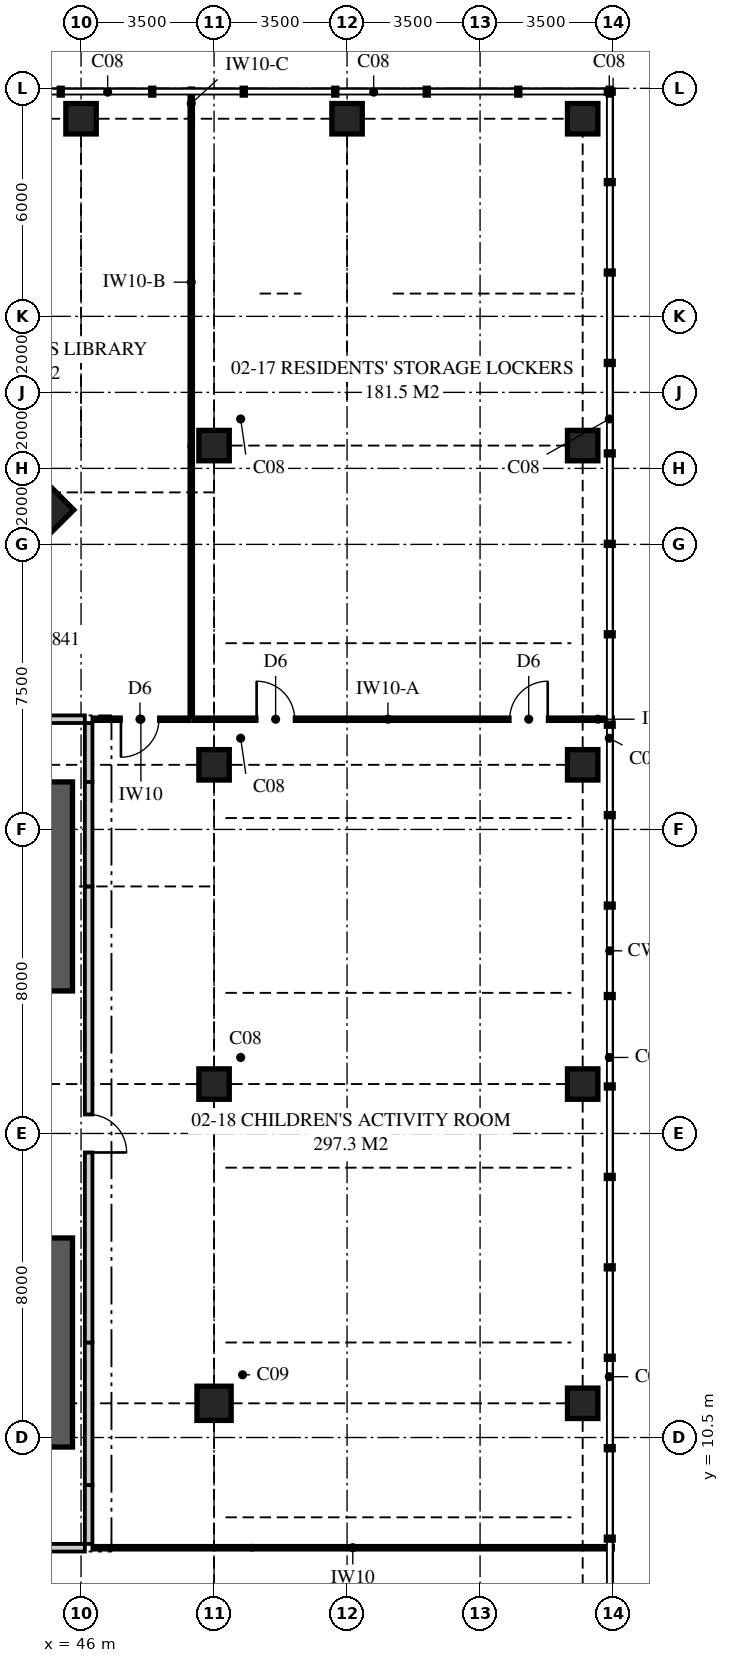
"""IFC4 building model, lengths in metres.
Left out: names, types, materials, properties, quantities, classifications, styles, units other than length and angle.
Written with IfcOpenShell. Run it as: python <this file> out.ifc"""

import sys

from ifc_helpers import new_model, si_unit, direction, frame, frame_2d, origin, origin_2d, place, context, subcontext, project, spatial, polyline, rectangle, outline, extrude, element, fill, save


model = new_model("IFC4")
c1 = context("Model", 3, precision=1e-05, world=origin(), true_north=direction((0.0, 1.0)))
c2 = subcontext(c1, "Body", "Model", "MODEL_VIEW")
j1 = project(units=[si_unit("LENGTHUNIT", "METRE"), si_unit("PLANEANGLEUNIT", "RADIAN")], contexts=[c1])
p1 = place(None, origin())
s1 = spatial("IfcSite", under=j1, at=p1, CompositionType="ELEMENT")
p2 = place(p1, origin())
s2 = spatial("IfcBuilding", under=s1, at=p2, CompositionType="ELEMENT")
p3 = place(p2, frame((0.0, 0.0, 11.0)))
s3 = spatial("IfcBuildingStorey", under=s2, at=p3, CompositionType="ELEMENT", Elevation=11.0)
p4 = place(p3, frame((43.369, 35.369, 0.0), z_axis=(0.0, 0.0, 1.0), x_axis=(-0.707106781187, -0.707106781187, 0.0)))
e1 = element("IfcColumn", 1, at=p4, inside=s3, PredefinedType="COLUMN", context=c2, shape_type="SweptSolid", body=[
    extrude(rectangle(XDim=2.8, YDim=4.1, at=origin_2d()), origin(), (0.0, 0.0, 1.0), 5.0),
])
p5 = place(p3, frame((49.5, 11.4, 0.0), z_axis=(0.0, 0.0, 1.0), x_axis=(1.0, 0.0, 0.0)))
e2 = element("IfcColumn", 2, at=p5, inside=s3, PredefinedType="COLUMN", context=c2, shape_type="SweptSolid", body=[
    extrude(rectangle(XDim=0.9, YDim=0.9, at=origin_2d()), origin(), (0.0, 0.0, 1.0), 5.0),
])
for number, where, z_axis, x_axis in (
    (3, (59.2, 11.4, 0.0), (0.0, 0.0, 1.0), (1.0, 0.0, 0.0)),
    (4, (49.5, 19.8, 0.0), (0.0, 0.0, 1.0), (1.0, 0.0, 0.0)),
    (5, (59.2, 19.8, 0.0), (0.0, 0.0, 1.0), (1.0, 0.0, 0.0)),
    (6, (49.5, 28.2, 0.0), (0.0, 0.0, 1.0), (1.0, 0.0, 0.0)),
    (7, (59.2, 28.2, 0.0), (0.0, 0.0, 1.0), (1.0, 0.0, 0.0)),
    (8, (49.5, 36.6, 0.0), (0.0, 0.0, 1.0), (1.0, 0.0, 0.0)),
    (9, (59.2, 36.6, 0.0), (0.0, 0.0, 1.0), (1.0, 0.0, 0.0)),
    (10, (46.0, 45.2, 0.0), (0.0, 0.0, 1.0), (1.0, 0.0, 0.0)),
    (11, (53.0, 45.2, 0.0), (0.0, 0.0, 1.0), (1.0, 0.0, 0.0)),
    (12, (59.2, 45.2, 0.0), (0.0, 0.0, 1.0), (1.0, 0.0, 0.0)),
):
    element("IfcColumn", number, at=place(p3, frame(where, z_axis=z_axis, x_axis=x_axis)), inside=s3, PredefinedType="COLUMN", context=c2, shape_type="SweptSolid", body=[
        extrude(rectangle(XDim=0.8, YDim=0.8, at=origin_2d()), origin(), (0.0, 0.0, 1.0), 5.0),
    ])
p6 = place(p3, frame((30.05, 7.6, 0.0), z_axis=(0.0, 0.0, 1.0), x_axis=(1.0, 0.0, 0.0)))
e13 = element("IfcWall", 13, at=p6, inside=s3, PredefinedType="PARTITIONING", context=c2, shape_type="SweptSolid", body=[
    extrude(outline(polyline([(0.0, 0.0), (16.05, 0.0), (16.05, 4.72), (14.629, 4.72), (14.629, 3.82), (12.009, 3.82), (12.009, 4.72), (6.26, 4.72), (6.26, 4.02), (3.64, 4.02), (3.64, 4.72), (0.26, 4.72), (0.26, 4.02), (0.0, 4.02), (0.0, 4.72), (0.0, 0.0)])), frame((0.0, 0.1, 0.0), z_axis=(0.0, -1.0, 0.0), x_axis=(1.0, 0.0, 0.0)), (0.0, 0.0, 1.0), 0.2),
])
p7 = place(p6, frame((7.55, 0.0, 0.0)))
e14 = element("IfcOpeningElement", 14, at=p7, cuts=e13, PredefinedType="OPENING", context=c2, shape_type="SweptSolid", body=[
    extrude(rectangle(XDim=1.0, YDim=2.1, at=frame_2d((0.5, 1.05))), frame((0.0, 0.11, 0.0), z_axis=(0.0, -1.0, 0.0), x_axis=(1.0, 0.0, 0.0)), (0.0, 0.0, 1.0), 0.22),
])
p8 = place(p3, frame((46.3, 7.6, 0.0), z_axis=(0.0, 0.0, 1.0), x_axis=(1.0, 0.0, 0.0)))
e15 = element("IfcWall", 15, at=p8, inside=s3, PredefinedType="PARTITIONING", context=c2, shape_type="SweptSolid", body=[
    extrude(outline(polyline([(0.0, 0.0), (4.2, 0.0), (4.2, 4.72), (3.56, 4.72), (3.56, 3.52), (2.84, 3.52), (2.84, 4.72), (0.0, 4.72), (0.0, 0.0)])), frame((0.0, 0.05, 0.0), z_axis=(0.0, -1.0, 0.0), x_axis=(1.0, 0.0, 0.0)), (0.0, 0.0, 1.0), 0.1),
])
p9 = place(p3, frame((50.5, 7.6, 0.0), z_axis=(0.0, 0.0, 1.0), x_axis=(1.0, 0.0, 0.0)))
e16 = element("IfcWall", 16, at=p9, inside=s3, PredefinedType="PARTITIONING", context=c2, shape_type="SweptSolid", body=[
    extrude(outline(polyline([(0.0, 0.0), (9.5, 0.0), (9.5, 4.72), (9.06, 4.72), (9.06, 3.52), (8.34, 3.52), (8.34, 4.72), (0.0, 4.72), (0.0, 0.0)])), frame((0.0, 0.05, 0.0), z_axis=(0.0, -1.0, 0.0), x_axis=(1.0, 0.0, 0.0)), (0.0, 0.0, 1.0), 0.1),
])
p10 = place(p3, frame((46.2, 7.7, 0.0), z_axis=(0.0, 0.0, 1.0), x_axis=(0.0, 1.0, 0.0)))
e17 = element("IfcWall", 17, at=p10, inside=s3, PredefinedType="PARTITIONING", context=c2, shape_type="SweptSolid", body=[
    extrude(rectangle(XDim=1.55, YDim=0.2, at=frame_2d((0.775, 0.0))), origin(), (0.0, 0.0, 1.0), 4.72),
])
p11 = place(p3, frame((46.2, 27.75, 0.0), z_axis=(0.0, 0.0, 1.0), x_axis=(0.0, 1.0, 0.0)))
e18 = element("IfcWall", 18, at=p11, inside=s3, PredefinedType="PARTITIONING", context=c2, shape_type="SweptSolid", body=[
    extrude(outline(polyline([(0.0, 0.0), (1.55, 0.0), (1.55, 4.72), (1.55, 4.02), (0.0, 4.02), (0.0, 4.72), (0.0, 0.0)])), frame((0.0, 0.1, 0.0), z_axis=(0.0, -1.0, 0.0), x_axis=(1.0, 0.0, 0.0)), (0.0, 0.0, 1.0), 0.2),
])
p12 = place(p3, frame((42.6, 29.4, 0.0), z_axis=(0.0, 0.0, 1.0), x_axis=(1.0, 0.0, 0.0)))
e19 = element("IfcWall", 19, at=p12, inside=s3, PredefinedType="PARTITIONING", context=c2, shape_type="SweptSolid", body=[
    extrude(rectangle(XDim=3.5, YDim=0.2, at=frame_2d((1.75, 0.0))), origin(), (0.0, 0.0, 1.0), 4.02),
])
p13 = place(p12, origin())
e20 = element("IfcOpeningElement", 20, at=p13, cuts=e19, PredefinedType="OPENING", context=c2, shape_type="SweptSolid", body=[
    extrude(rectangle(XDim=1.0, YDim=2.1, at=frame_2d((0.5, 1.05))), frame((0.0, 0.11, 0.0), z_axis=(0.0, -1.0, 0.0), x_axis=(1.0, 0.0, 0.0)), (0.0, 0.0, 1.0), 0.22),
])
p14 = place(p3, frame((46.2, 9.25, 0.0), z_axis=(0.0, 0.0, 1.0), x_axis=(0.0, 1.0, 0.0)))
e21 = element("IfcWall", 21, at=p14, inside=s3, PredefinedType="PARTITIONING", context=c2, shape_type="SweptSolid", body=[
    extrude(outline(polyline([(0.0, 0.0), (3.75, 0.0), (3.75, 4.02), (3.64, 4.02), (3.64, 4.72), (3.46, 4.72), (3.46, 4.02), (0.84, 4.02), (0.84, 4.72), (0.0, 4.72), (0.0, 0.0)])), frame((0.0, 0.1, 0.0), z_axis=(0.0, -1.0, 0.0), x_axis=(1.0, 0.0, 0.0)), (0.0, 0.0, 1.0), 0.2),
])
p15 = place(p3, frame((46.2, 13.0, 0.0), z_axis=(0.0, 0.0, 1.0), x_axis=(0.0, 1.0, 0.0)))
e22 = element("IfcWall", 22, at=p15, inside=s3, PredefinedType="PARTITIONING", context=c2, shape_type="SweptSolid", body=[
    extrude(rectangle(XDim=12.0, YDim=0.2, at=frame_2d((6.0, 0.0))), origin(), (0.0, 0.0, 1.0), 4.02),
])
p16 = place(p15, frame((5.0, 0.0, 0.0)))
e23 = element("IfcOpeningElement", 23, at=p16, cuts=e22, PredefinedType="OPENING", context=c2, shape_type="SweptSolid", body=[
    extrude(rectangle(XDim=1.0, YDim=2.1, at=frame_2d((0.5, 1.05))), frame((0.0, 0.11, 0.0), z_axis=(0.0, -1.0, 0.0), x_axis=(1.0, 0.0, 0.0)), (0.0, 0.0, 1.0), 0.22),
])
p17 = place(p3, frame((46.2, 25.0, 0.0), z_axis=(0.0, 0.0, 1.0), x_axis=(0.0, 1.0, 0.0)))
e24 = element("IfcWall", 24, at=p17, inside=s3, PredefinedType="PARTITIONING", context=c2, shape_type="SweptSolid", body=[
    extrude(outline(polyline([(0.0, 0.0), (2.75, 0.0), (2.75, 4.02), (1.89, 4.02), (1.89, 4.72), (1.31, 4.72), (1.31, 4.02), (0.0, 4.02), (0.0, 0.0)])), frame((0.0, 0.1, 0.0), z_axis=(0.0, -1.0, 0.0), x_axis=(1.0, 0.0, 0.0)), (0.0, 0.0, 1.0), 0.2),
])
p18 = place(p3, frame((48.95, 29.4, 0.0), z_axis=(0.0, 0.0, 1.0), x_axis=(1.0, 0.0, 0.0)))
e25 = element("IfcWall", 25, at=p18, inside=s3, PredefinedType="PARTITIONING", context=c2, shape_type="SweptSolid", body=[
    extrude(outline(polyline([(0.0, 0.0), (10.25, 0.0), (10.25, 3.52), (9.95, 3.52), (9.95, 4.02), (0.91, 4.02), (0.91, 3.52), (0.25, 3.52), (0.25, 4.02), (0.0, 4.02), (0.0, 0.0)])), frame((0.0, 0.05, 0.0), z_axis=(0.0, -1.0, 0.0), x_axis=(1.0, 0.0, 0.0)), (0.0, 0.0, 1.0), 0.1),
])
p19 = place(p18, frame((1.67, 0.0, 0.0)))
e26 = element("IfcOpeningElement", 26, at=p19, cuts=e25, PredefinedType="OPENING", context=c2, shape_type="SweptSolid", body=[
    extrude(rectangle(XDim=1.0, YDim=2.1, at=frame_2d((0.5, 1.05))), frame((0.0, 0.06, 0.0), z_axis=(0.0, -1.0, 0.0), x_axis=(1.0, 0.0, 0.0)), (0.0, 0.0, 1.0), 0.12),
])
p20 = place(p18, frame((8.33, 0.0, 0.0)))
e27 = element("IfcOpeningElement", 27, at=p20, cuts=e25, PredefinedType="OPENING", context=c2, shape_type="SweptSolid", body=[
    extrude(rectangle(XDim=1.0, YDim=2.1, at=frame_2d((0.5, 1.05))), frame((0.0, 0.06, 0.0), z_axis=(0.0, -1.0, 0.0), x_axis=(1.0, 0.0, 0.0)), (0.0, 0.0, 1.0), 0.12),
])
p21 = place(p3, frame((59.2, 29.4, 0.0), z_axis=(0.0, 0.0, 1.0), x_axis=(1.0, 0.0, 0.0)))
e28 = element("IfcWall", 28, at=p21, inside=s3, PredefinedType="PARTITIONING", context=c2, shape_type="SweptSolid", body=[
    extrude(outline(polyline([(0.0, 0.0), (0.8, 0.0), (0.8, 4.72), (0.36, 4.72), (0.36, 3.52), (0.0, 3.52), (0.0, 0.0)])), frame((0.0, 0.05, 0.0), z_axis=(0.0, -1.0, 0.0), x_axis=(1.0, 0.0, 0.0)), (0.0, 0.0, 1.0), 0.1),
])
p22 = place(p3, frame((48.9, 29.45, 0.0), z_axis=(0.0, 0.0, 1.0), x_axis=(0.0, 1.0, 0.0)))
e29 = element("IfcWall", 29, at=p22, inside=s3, PredefinedType="PARTITIONING", context=c2, shape_type="SweptSolid", body=[
    extrude(outline(polyline([(0.0, 0.0), (7.15, 0.0), (7.15, 4.02), (4.659, 4.02), (4.659, 4.72), (0.01, 4.72), (0.01, 4.02), (0.0, 4.02), (0.0, 0.0)])), frame((0.0, 0.05, 0.0), z_axis=(0.0, -1.0, 0.0), x_axis=(1.0, 0.0, 0.0)), (0.0, 0.0, 1.0), 0.1),
])
p23 = place(p3, frame((48.9, 36.6, 0.0), z_axis=(0.0, 0.0, 1.0), x_axis=(0.0, 1.0, 0.0)))
e30 = element("IfcWall", 30, at=p23, inside=s3, PredefinedType="PARTITIONING", context=c2, shape_type="SweptSolid", body=[
    extrude(rectangle(XDim=8.6, YDim=0.1, at=frame_2d((4.3, 0.0))), origin(), (0.0, 0.0, 1.0), 4.02),
])
p24 = place(p3, frame((48.9, 45.2, 0.0), z_axis=(0.0, 0.0, 1.0), x_axis=(0.0, 1.0, 0.0)))
e31 = element("IfcWall", 31, at=p24, inside=s3, PredefinedType="PARTITIONING", context=c2, shape_type="SweptSolid", body=[
    extrude(rectangle(XDim=0.8, YDim=0.1, at=frame_2d((0.4, 0.0))), origin(), (0.0, 0.0, 1.0), 4.02),
])
p25 = place(p3, frame((46.3, 29.4, 0.0), z_axis=(0.0, 0.0, 1.0), x_axis=(1.0, 0.0, 0.0)))
e32 = element("IfcWall", 32, at=p25, inside=s3, PredefinedType="PARTITIONING", context=c2, shape_type="SweptSolid", body=[
    extrude(outline(polyline([(0.0, 0.0), (2.55, 0.0), (2.55, 4.72), (2.55, 4.02), (0.0, 4.02), (0.0, 4.72), (0.0, 0.0)])), frame((0.0, 0.05, 0.0), z_axis=(0.0, -1.0, 0.0), x_axis=(1.0, 0.0, 0.0)), (0.0, 0.0, 1.0), 0.1),
])
p26 = place(p25, frame((0.75, 0.0, 0.0)))
e33 = element("IfcOpeningElement", 33, at=p26, cuts=e32, PredefinedType="OPENING", context=c2, shape_type="SweptSolid", body=[
    extrude(rectangle(XDim=1.0, YDim=2.1, at=frame_2d((0.5, 1.05))), frame((0.0, 0.06, 0.0), z_axis=(0.0, -1.0, 0.0), x_axis=(1.0, 0.0, 0.0)), (0.0, 0.0, 1.0), 0.12),
])
for number, where, z_axis, x_axis in (
    (34, (45.05, 10.25, 0.0), (0.0, 0.0, 1.0), (0.0, 1.0, 0.0)),
    (35, (45.05, 22.25, 0.0), (0.0, 0.0, 1.0), (0.0, 1.0, 0.0)),
):
    element("IfcWall", number, at=place(p3, frame(where, z_axis=z_axis, x_axis=x_axis)), inside=s3, PredefinedType="SHEAR", context=c2, shape_type="SweptSolid", body=[
        extrude(rectangle(XDim=5.5, YDim=1.45, at=frame_2d((2.75, 0.0))), origin(), (0.0, 0.0, 1.0), 5.0),
    ])
p27 = place(p16, frame((1.0, 0.0, 0.0), z_axis=(0.0, 0.0, 1.0), x_axis=(-1.0, 0.0, 0.0)))
e36 = element("IfcDoor", 36, at=p27, inside=s3, OperationType="SINGLE_SWING_RIGHT", PredefinedType="DOOR", context=c2, shape_type="SweptSolid", body=[
    extrude(rectangle(XDim=1.0, YDim=2.1, at=frame_2d((0.5, 1.05))), frame((0.0, 0.025, 0.0), z_axis=(0.0, -1.0, 0.0), x_axis=(1.0, 0.0, 0.0)), (0.0, 0.0, 1.0), 0.05),
])
fill(e23, e36)
p28 = place(p19, origin())
e37 = element("IfcDoor", 37, at=p28, inside=s3, OperationType="SINGLE_SWING_LEFT", PredefinedType="DOOR", context=c2, shape_type="SweptSolid", body=[
    extrude(rectangle(XDim=1.0, YDim=2.1, at=frame_2d((0.5, 1.05))), frame((0.0, 0.025, 0.0), z_axis=(0.0, -1.0, 0.0), x_axis=(1.0, 0.0, 0.0)), (0.0, 0.0, 1.0), 0.05),
])
fill(e26, e37)
p29 = place(p20, origin())
e38 = element("IfcDoor", 38, at=p29, inside=s3, OperationType="SINGLE_SWING_RIGHT", PredefinedType="DOOR", context=c2, shape_type="SweptSolid", body=[
    extrude(rectangle(XDim=1.0, YDim=2.1, at=frame_2d((0.5, 1.05))), frame((0.0, 0.025, 0.0), z_axis=(0.0, -1.0, 0.0), x_axis=(1.0, 0.0, 0.0)), (0.0, 0.0, 1.0), 0.05),
])
fill(e27, e38)
p30 = place(p26, frame((1.0, 0.0, 0.0), z_axis=(0.0, 0.0, 1.0), x_axis=(-1.0, 0.0, 0.0)))
e39 = element("IfcDoor", 39, at=p30, inside=s3, OperationType="SINGLE_SWING_RIGHT", PredefinedType="DOOR", context=c2, shape_type="SweptSolid", body=[
    extrude(rectangle(XDim=1.0, YDim=2.1, at=frame_2d((0.5, 1.05))), frame((0.0, 0.025, 0.0), z_axis=(0.0, -1.0, 0.0), x_axis=(1.0, 0.0, 0.0)), (0.0, 0.0, 1.0), 0.05),
])
fill(e33, e39)
save(model, sys.argv[1])
